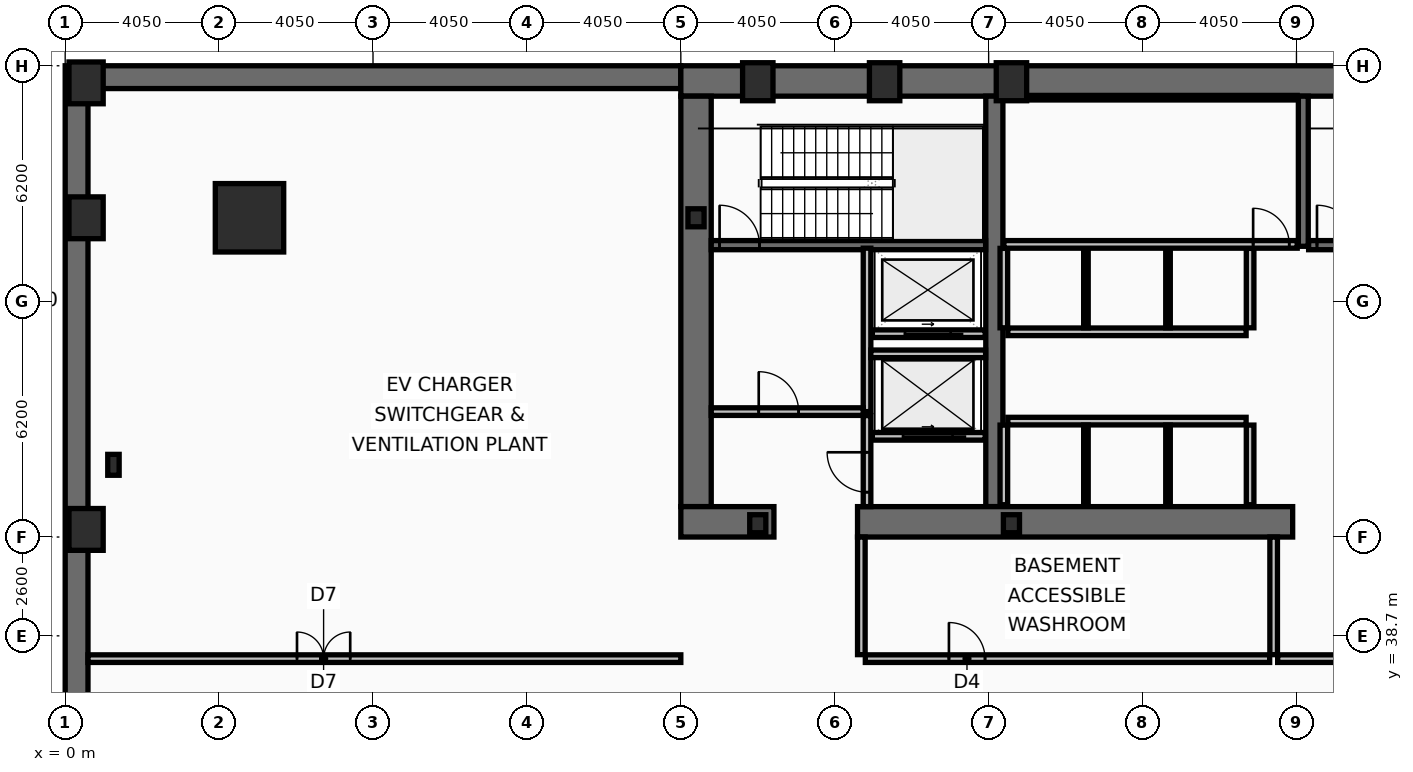
"""IFC4 building model, lengths in metres.
Left out: names, types, materials, properties, quantities, classifications, styles, units other than length and angle.
Written with IfcOpenShell. Run it as: python <this file> out.ifc"""

import sys

from ifc_helpers import new_model, si_unit, direction, frame, frame_2d, origin, origin_2d, place, context, subcontext, project, spatial, rectangle, hollow_rectangle, i_section, extrude, element, fill, save


model = new_model("IFC4")
c1 = context("Model", 3, precision=1e-05, world=origin(), true_north=direction((0.0, 1.0)))
c2 = subcontext(c1, "Body", "Model", "MODEL_VIEW")
j1 = project(units=[si_unit("LENGTHUNIT", "METRE"), si_unit("PLANEANGLEUNIT", "RADIAN")], contexts=[c1])
p1 = place(None, origin())
s1 = spatial("IfcSite", under=j1, at=p1, CompositionType="ELEMENT")
p2 = place(p1, origin())
s2 = spatial("IfcBuilding", under=s1, at=p2, CompositionType="ELEMENT")
p3 = place(p2, frame((0.0, 0.0, -4.5)))
s3 = spatial("IfcBuildingStorey", under=s2, at=p3, CompositionType="ELEMENT", Elevation=-4.5)
p4 = place(p3, frame((0.3, 0.0, 0.0), z_axis=(0.0, 0.0, 1.0), x_axis=(0.0, 1.0, 0.0)))
e1 = element("IfcWall", 1, at=p4, inside=s3, PredefinedType="SOLIDWALL", context=c2, shape_type="SweptSolid", body=[
    extrude(rectangle(XDim=53.7, YDim=0.6, at=frame_2d((26.85, 0.0))), origin(), (0.0, 0.0, 1.0), 4.28),
])
p5 = place(p3, frame((0.6, 53.4, 0.0), z_axis=(0.0, 0.0, 1.0), x_axis=(1.0, 0.0, 0.0)))
e2 = element("IfcWall", 2, at=p5, inside=s3, PredefinedType="SOLIDWALL", context=c2, shape_type="SweptSolid", body=[
    extrude(rectangle(XDim=15.6, YDim=0.6, at=frame_2d((7.8, 0.0))), origin(), (0.0, 0.0, 1.0), 4.28),
])
p6 = place(p3, frame((16.2, 53.3, 0.0), z_axis=(0.0, 0.0, 1.0), x_axis=(1.0, 0.0, 0.0)))
e3 = element("IfcWall", 3, at=p6, inside=s3, PredefinedType="SHEAR", context=c2, shape_type="SweptSolid", body=[
    extrude(rectangle(XDim=40.5, YDim=0.8, at=frame_2d((20.25, 0.0))), origin(), (0.0, 0.0, 1.0), 4.28),
])
p7 = place(p3, frame((16.6, 42.1, 0.0), z_axis=(0.0, 0.0, 1.0), x_axis=(0.0, 1.0, 0.0)))
e4 = element("IfcWall", 4, at=p7, inside=s3, PredefinedType="SHEAR", context=c2, shape_type="SweptSolid", body=[
    extrude(rectangle(XDim=10.8, YDim=0.8, at=frame_2d((5.4, 0.0))), origin(), (0.0, 0.0, 1.0), 4.28),
])
p8 = place(p3, frame((24.45, 42.1, 0.0), z_axis=(0.0, 0.0, 1.0), x_axis=(0.0, 1.0, 0.0)))
e5 = element("IfcWall", 5, at=p8, inside=s3, PredefinedType="SHEAR", context=c2, shape_type="SweptSolid", body=[
    extrude(rectangle(XDim=10.8, YDim=0.45, at=frame_2d((5.4, 0.0))), origin(), (0.0, 0.0, 1.0), 4.28),
])
p9 = place(p3, frame((18.65, 41.7, 0.0), z_axis=(0.0, 0.0, 1.0), x_axis=(-1.0, 0.0, 0.0)))
e6 = element("IfcWall", 6, at=p9, inside=s3, PredefinedType="SHEAR", context=c2, shape_type="SweptSolid", body=[
    extrude(rectangle(XDim=2.45, YDim=0.8, at=frame_2d((1.225, 0.0))), origin(), (0.0, 0.0, 1.0), 4.28),
])
p10 = place(p3, frame((32.3, 41.7, 0.0), z_axis=(0.0, 0.0, 1.0), x_axis=(-1.0, 0.0, 0.0)))
e7 = element("IfcWall", 7, at=p10, inside=s3, PredefinedType="SHEAR", context=c2, shape_type="SweptSolid", body=[
    extrude(rectangle(XDim=11.45, YDim=0.8, at=frame_2d((5.725, 0.0))), origin(), (0.0, 0.0, 1.0), 4.28),
])
p11 = place(p3, frame((32.58, 48.95, 0.0), z_axis=(0.0, 0.0, 1.0), x_axis=(0.0, 1.0, 0.0)))
e8 = element("IfcWall", 8, at=p11, inside=s3, PredefinedType="SHEAR", context=c2, shape_type="SweptSolid", body=[
    extrude(rectangle(XDim=3.95, YDim=0.26, at=frame_2d((1.975, 0.0))), origin(), (0.0, 0.0, 1.0), 4.28),
])
p12 = place(p3, frame((17.0, 48.98, 0.0), z_axis=(0.0, 0.0, 1.0), x_axis=(1.0, 0.0, 0.0)))
e9 = element("IfcWall", 9, at=p12, inside=s3, PredefinedType="SHEAR", context=c2, shape_type="SweptSolid", body=[
    extrude(rectangle(XDim=7.22, YDim=0.24, at=frame_2d((3.61, 0.0))), origin(), (0.0, 0.0, 1.0), 4.28),
])
p13 = place(p12, frame((0.22, 0.0, 0.0)))
e10 = element("IfcOpeningElement", 10, at=p13, cuts=e9, PredefinedType="OPENING", context=c2, shape_type="SweptSolid", body=[
    extrude(rectangle(XDim=1.05, YDim=2.15, at=frame_2d((0.525, 1.075))), frame((0.0, 0.13, 0.0), z_axis=(0.0, -1.0, 0.0), x_axis=(1.0, 0.0, 0.0)), (0.0, 0.0, 1.0), 0.26),
])
p14 = place(p3, frame((32.72, 48.98, 0.0), z_axis=(0.0, 0.0, 1.0), x_axis=(1.0, 0.0, 0.0)))
e11 = element("IfcWall", 11, at=p14, inside=s3, PredefinedType="SHEAR", context=c2, shape_type="SweptSolid", body=[
    extrude(rectangle(XDim=7.56, YDim=0.24, at=frame_2d((3.78, 0.0))), origin(), (0.0, 0.0, 1.0), 4.28),
])
p15 = place(p14, frame((0.22, 0.0, 0.0)))
e12 = element("IfcOpeningElement", 12, at=p15, cuts=e11, PredefinedType="OPENING", context=c2, shape_type="SweptSolid", body=[
    extrude(rectangle(XDim=1.05, YDim=2.15, at=frame_2d((0.525, 1.075))), frame((0.0, 0.13, 0.0), z_axis=(0.0, -1.0, 0.0), x_axis=(1.0, 0.0, 0.0)), (0.0, 0.0, 1.0), 0.26),
])
p16 = place(p3, frame((4.85, 49.7, 0.0), z_axis=(0.0, 0.0, 1.0), x_axis=(1.0, 0.0, 0.0)))
e13 = element("IfcColumn", 13, at=p16, inside=s3, PredefinedType="COLUMN", context=c2, shape_type="SweptSolid", body=[
    extrude(hollow_rectangle(XDim=1.8, YDim=1.8, WallThickness=0.08, at=origin_2d()), origin(), (0.0, 0.0, 1.0), 4.5),
])
for number, where, z_axis, x_axis in (
    (14, (18.225, 53.28, 0.0), (0.0, 0.0, 1.0), (1.0, 0.0, 0.0)),
    (15, (21.562, 53.28, 0.0), (0.0, 0.0, 1.0), (1.0, 0.0, 0.0)),
    (16, (24.9, 53.28, 0.0), (0.0, 0.0, 1.0), (1.0, 0.0, 0.0)),
):
    element("IfcColumn", number, at=place(p3, frame(where, z_axis=z_axis, x_axis=x_axis)), inside=s3, PredefinedType="COLUMN", context=c2, shape_type="SweptSolid", body=[
        extrude(hollow_rectangle(XDim=0.8, YDim=1.0, WallThickness=0.055, at=origin_2d()), origin(), (0.0, 0.0, 1.0), 4.5),
    ])
p17 = place(p3, frame((1.27, 43.2, 0.0), z_axis=(0.0, 0.0, 1.0), x_axis=(1.0, 0.0, 0.0)))
e17 = element("IfcColumn", 17, at=p17, inside=s3, PredefinedType="COLUMN", context=c2, shape_type="SweptSolid", body=[
    extrude(i_section(OverallWidth=0.3, OverallDepth=0.55, WebThickness=0.015, FlangeThickness=0.029, at=origin_2d()), origin(), (0.0, 0.0, 1.0), 4.5),
])
for number, where, z_axis, x_axis in (
    (18, (16.6, 49.7, 0.0), (0.0, 0.0, 1.0), (1.0, 0.0, 0.0)),
    (19, (18.225, 41.65, 0.0), (0.0, 0.0, 1.0), (1.0, 0.0, 0.0)),
    (20, (24.9, 41.65, 0.0), (0.0, 0.0, 1.0), (1.0, 0.0, 0.0)),
):
    element("IfcColumn", number, at=place(p3, frame(where, z_axis=z_axis, x_axis=x_axis)), inside=s3, PredefinedType="COLUMN", context=c2, shape_type="SweptSolid", body=[
        extrude(i_section(OverallWidth=0.424, OverallDepth=0.474, WebThickness=0.048, FlangeThickness=0.077, at=origin_2d()), origin(), (0.0, 0.0, 1.0), 4.5),
    ])
for number, where, z_axis, x_axis in (
    (21, (0.55, 49.7, 0.0), (0.0, 0.0, 1.0), (1.0, 0.0, 0.0)),
    (22, (0.55, 53.25, 0.0), (0.0, 0.0, 1.0), (1.0, 0.0, 0.0)),
    (23, (0.55, 41.5, 0.0), (0.0, 0.0, 1.0), (1.0, 0.0, 0.0)),
):
    element("IfcColumn", number, at=place(p3, frame(where, z_axis=z_axis, x_axis=x_axis)), inside=s3, PredefinedType="PILASTER", context=c2, shape_type="SweptSolid", body=[
        extrude(rectangle(XDim=0.9, YDim=1.1, at=origin_2d()), origin(), (0.0, 0.0, 1.0), 4.5),
    ])
p18 = place(p3, frame((24.21, 43.95, 0.0), z_axis=(0.0, 0.0, 1.0), x_axis=(-1.0, 0.0, 0.0)))
e24 = element("IfcWall", 24, at=p18, inside=s3, PredefinedType="PARTITIONING", context=c2, shape_type="SweptSolid", body=[
    extrude(rectangle(XDim=2.97, YDim=0.2, at=frame_2d((1.485, 0.0))), origin(), (0.0, 0.0, 1.0), 4.28),
])
p19 = place(p18, frame((0.86, 0.0, 0.0)))
e25 = element("IfcOpeningElement", 25, at=p19, cuts=e24, PredefinedType="OPENING", context=c2, shape_type="SweptSolid", body=[
    extrude(rectangle(XDim=1.3, YDim=2.18, at=frame_2d((0.65, 1.09))), frame((0.0, 0.11, 0.0), z_axis=(0.0, -1.0, 0.0), x_axis=(1.0, 0.0, 0.0)), (0.0, 0.0, 1.0), 0.22),
])
p20 = place(p3, frame((24.21, 46.65, 0.0), z_axis=(0.0, 0.0, 1.0), x_axis=(-1.0, 0.0, 0.0)))
e26 = element("IfcWall", 26, at=p20, inside=s3, PredefinedType="PARTITIONING", context=c2, shape_type="SweptSolid", body=[
    extrude(rectangle(XDim=2.97, YDim=0.2, at=frame_2d((1.485, 0.0))), origin(), (0.0, 0.0, 1.0), 4.28),
])
p21 = place(p20, frame((0.91, 0.0, 0.0)))
e27 = element("IfcOpeningElement", 27, at=p21, cuts=e26, PredefinedType="OPENING", context=c2, shape_type="SweptSolid", body=[
    extrude(rectangle(XDim=1.2, YDim=2.18, at=frame_2d((0.6, 1.09))), frame((0.0, 0.11, 0.0), z_axis=(0.0, -1.0, 0.0), x_axis=(1.0, 0.0, 0.0)), (0.0, 0.0, 1.0), 0.22),
])
p22 = place(p3, frame((21.1, 44.6, 0.0), z_axis=(0.0, 0.0, 1.0), x_axis=(0.0, 1.0, 0.0)))
e28 = element("IfcWall", 28, at=p22, inside=s3, PredefinedType="PARTITIONING", context=c2, shape_type="SweptSolid", body=[
    extrude(rectangle(XDim=4.3, YDim=0.2, at=frame_2d((2.15, 0.0))), origin(), (0.0, 0.0, 1.0), 4.28),
])
p23 = place(p3, frame((17.0, 44.6, 0.0), z_axis=(0.0, 0.0, 1.0), x_axis=(1.0, 0.0, 0.0)))
e29 = element("IfcWall", 29, at=p23, inside=s3, PredefinedType="PARTITIONING", context=c2, shape_type="SweptSolid", body=[
    extrude(rectangle(XDim=4.0, YDim=0.2, at=frame_2d((2.0, 0.0))), origin(), (0.0, 0.0, 1.0), 4.28),
])
p24 = place(p23, frame((1.25, 0.0, 0.0)))
e30 = element("IfcOpeningElement", 30, at=p24, cuts=e29, PredefinedType="OPENING", context=c2, shape_type="SweptSolid", body=[
    extrude(rectangle(XDim=1.05, YDim=2.15, at=frame_2d((0.525, 1.075))), frame((0.0, 0.11, 0.0), z_axis=(0.0, -1.0, 0.0), x_axis=(1.0, 0.0, 0.0)), (0.0, 0.0, 1.0), 0.22),
])
p25 = place(p3, frame((21.2, 46.12, 0.0), z_axis=(0.0, 0.0, 1.0), x_axis=(1.0, 0.0, 0.0)))
e31 = element("IfcWall", 31, at=p25, inside=s3, PredefinedType="PARTITIONING", context=c2, shape_type="SweptSolid", body=[
    extrude(rectangle(XDim=3.02, YDim=0.2, at=frame_2d((1.51, 0.0))), origin(), (0.0, 0.0, 1.0), 4.28),
])
p26 = place(p3, frame((21.1, 42.1, 0.0), z_axis=(0.0, 0.0, 1.0), x_axis=(0.0, 1.0, 0.0)))
e32 = element("IfcWall", 32, at=p26, inside=s3, PredefinedType="PARTITIONING", context=c2, shape_type="SweptSolid", body=[
    extrude(rectangle(XDim=2.395, YDim=0.2, at=frame_2d((1.198, 0.0))), origin(), (0.0, 0.0, 1.0), 4.28),
])
p27 = place(p26, frame((0.38, 0.0, 0.0)))
e33 = element("IfcOpeningElement", 33, at=p27, cuts=e32, PredefinedType="OPENING", context=c2, shape_type="SweptSolid", body=[
    extrude(rectangle(XDim=1.05, YDim=2.15, at=frame_2d((0.525, 1.075))), frame((0.0, 0.11, 0.0), z_axis=(0.0, -1.0, 0.0), x_axis=(1.0, 0.0, 0.0)), (0.0, 0.0, 1.0), 0.22),
])
p28 = place(p3, frame((24.805, 46.7, 0.0), z_axis=(0.0, 0.0, 1.0), x_axis=(1.0, 0.0, 0.0)))
e34 = element("IfcWall", 34, at=p28, inside=s3, PredefinedType="PARTITIONING", context=c2, shape_type="SweptSolid", body=[
    extrude(rectangle(XDim=6.27, YDim=0.2, at=frame_2d((3.135, 0.0))), origin(), (0.0, 0.0, 1.0), 4.28),
])
for number, where, z_axis, x_axis in (
    (35, (24.7, 46.805, 0.0), (0.0, 0.0, 1.0), (0.0, 1.0, 0.0)),
    (36, (31.18, 46.805, 0.0), (0.0, 0.0, 1.0), (0.0, 1.0, 0.0)),
):
    element("IfcWall", number, at=place(p3, frame(where, z_axis=z_axis, x_axis=x_axis)), inside=s3, PredefinedType="PARTITIONING", context=c2, shape_type="SweptSolid", body=[
        extrude(rectangle(XDim=2.09, YDim=0.2, at=frame_2d((1.045, 0.0))), origin(), (0.0, 0.0, 1.0), 4.28),
    ])
for number, where, z_axis, x_axis in (
    (37, (26.86, 46.805, 0.0), (0.0, 0.0, 1.0), (0.0, 1.0, 0.0)),
    (38, (29.02, 46.805, 0.0), (0.0, 0.0, 1.0), (0.0, 1.0, 0.0)),
):
    element("IfcWall", number, at=place(p3, frame(where, z_axis=z_axis, x_axis=x_axis)), inside=s3, PredefinedType="PARTITIONING", context=c2, shape_type="SweptSolid", body=[
        extrude(rectangle(XDim=2.09, YDim=0.12, at=frame_2d((1.045, 0.0))), origin(), (0.0, 0.0, 1.0), 4.28),
    ])
p29 = place(p3, frame((24.805, 44.35, 0.0), z_axis=(0.0, 0.0, 1.0), x_axis=(1.0, 0.0, 0.0)))
e39 = element("IfcWall", 39, at=p29, inside=s3, PredefinedType="PARTITIONING", context=c2, shape_type="SweptSolid", body=[
    extrude(rectangle(XDim=6.27, YDim=0.2, at=frame_2d((3.135, 0.0))), origin(), (0.0, 0.0, 1.0), 4.28),
])
for number, where, z_axis, x_axis in (
    (40, (24.7, 42.15, 0.0), (0.0, 0.0, 1.0), (0.0, 1.0, 0.0)),
    (41, (31.18, 42.15, 0.0), (0.0, 0.0, 1.0), (0.0, 1.0, 0.0)),
):
    element("IfcWall", number, at=place(p3, frame(where, z_axis=z_axis, x_axis=x_axis)), inside=s3, PredefinedType="PARTITIONING", context=c2, shape_type="SweptSolid", body=[
        extrude(rectangle(XDim=2.095, YDim=0.2, at=frame_2d((1.048, 0.0))), origin(), (0.0, 0.0, 1.0), 4.28),
    ])
for number, where, z_axis, x_axis in (
    (42, (26.86, 42.15, 0.0), (0.0, 0.0, 1.0), (0.0, 1.0, 0.0)),
    (43, (29.02, 42.15, 0.0), (0.0, 0.0, 1.0), (0.0, 1.0, 0.0)),
):
    element("IfcWall", number, at=place(p3, frame(where, z_axis=z_axis, x_axis=x_axis)), inside=s3, PredefinedType="PARTITIONING", context=c2, shape_type="SweptSolid", body=[
        extrude(rectangle(XDim=2.095, YDim=0.12, at=frame_2d((1.048, 0.0))), origin(), (0.0, 0.0, 1.0), 4.28),
    ])
p30 = place(p3, frame((24.7, 52.86, 0.0), z_axis=(0.0, 0.0, 1.0), x_axis=(1.0, 0.0, 0.0)))
e44 = element("IfcWall", 44, at=p30, inside=s3, PredefinedType="PARTITIONING", context=c2, shape_type="SweptSolid", body=[
    extrude(rectangle(XDim=7.72, YDim=0.12, at=frame_2d((3.86, 0.0))), origin(), (0.0, 0.0, 1.0), 4.28),
])
p31 = place(p3, frame((24.7, 49.0, 0.0), z_axis=(0.0, 0.0, 1.0), x_axis=(1.0, 0.0, 0.0)))
e45 = element("IfcWall", 45, at=p31, inside=s3, PredefinedType="PARTITIONING", context=c2, shape_type="SweptSolid", body=[
    extrude(rectangle(XDim=7.72, YDim=0.2, at=frame_2d((3.86, 0.0))), origin(), (0.0, 0.0, 1.0), 4.28),
])
p32 = place(p31, frame((6.56, 0.0, 0.0)))
e46 = element("IfcOpeningElement", 46, at=p32, cuts=e45, PredefinedType="OPENING", context=c2, shape_type="SweptSolid", body=[
    extrude(rectangle(XDim=0.95, YDim=2.1, at=frame_2d((0.475, 1.05))), frame((0.0, 0.11, 0.0), z_axis=(0.0, -1.0, 0.0), x_axis=(1.0, 0.0, 0.0)), (0.0, 0.0, 1.0), 0.22),
])
p33 = place(p3, frame((31.905, 38.1, 0.0), z_axis=(0.0, 0.0, 1.0), x_axis=(1.0, 0.0, 0.0)))
e47 = element("IfcWall", 47, at=p33, inside=s3, PredefinedType="PARTITIONING", context=c2, shape_type="SweptSolid", body=[
    extrude(rectangle(XDim=9.19, YDim=0.2, at=frame_2d((4.595, 0.0))), origin(), (0.0, 0.0, 1.0), 4.28),
])
p34 = place(p33, frame((3.8, 0.0, 0.0)))
e48 = element("IfcOpeningElement", 48, at=p34, cuts=e47, PredefinedType="OPENING", context=c2, shape_type="SweptSolid", body=[
    extrude(rectangle(XDim=1.5, YDim=2.15, at=frame_2d((0.75, 1.075))), frame((0.0, 0.11, 0.0), z_axis=(0.0, -1.0, 0.0), x_axis=(1.0, 0.0, 0.0)), (0.0, 0.0, 1.0), 0.22),
])
p35 = place(p3, frame((31.8, 38.205, 0.0), z_axis=(0.0, 0.0, 1.0), x_axis=(0.0, 1.0, 0.0)))
e49 = element("IfcWall", 49, at=p35, inside=s3, PredefinedType="PARTITIONING", context=c2, shape_type="SweptSolid", body=[
    extrude(rectangle(XDim=3.095, YDim=0.2, at=frame_2d((1.547, 0.0))), origin(), (0.0, 0.0, 1.0), 4.28),
])
p36 = place(p3, frame((0.6, 38.1, 0.0), z_axis=(0.0, 0.0, 1.0), x_axis=(1.0, 0.0, 0.0)))
e50 = element("IfcWall", 50, at=p36, inside=s3, PredefinedType="PARTITIONING", context=c2, shape_type="SweptSolid", body=[
    extrude(rectangle(XDim=15.6, YDim=0.2, at=frame_2d((7.8, 0.0))), origin(), (0.0, 0.0, 1.0), 3.59),
])
p37 = place(p36, frame((5.5, 0.0, 0.0)))
e51 = element("IfcOpeningElement", 51, at=p37, cuts=e50, PredefinedType="OPENING", context=c2, shape_type="SweptSolid", body=[
    extrude(rectangle(XDim=1.4, YDim=2.15, at=frame_2d((0.7, 1.075))), frame((0.0, 0.11, 0.0), z_axis=(0.0, -1.0, 0.0), x_axis=(1.0, 0.0, 0.0)), (0.0, 0.0, 1.0), 0.22),
])
p38 = place(p3, frame((20.95, 38.205, 0.0), z_axis=(0.0, 0.0, 1.0), x_axis=(0.0, 1.0, 0.0)))
e52 = element("IfcWall", 52, at=p38, inside=s3, PredefinedType="PARTITIONING", context=c2, shape_type="SweptSolid", body=[
    extrude(rectangle(XDim=3.095, YDim=0.2, at=frame_2d((1.547, 0.0))), origin(), (0.0, 0.0, 1.0), 4.28),
])
p39 = place(p3, frame((21.055, 38.1, 0.0), z_axis=(0.0, 0.0, 1.0), x_axis=(1.0, 0.0, 0.0)))
e53 = element("IfcWall", 53, at=p39, inside=s3, PredefinedType="PARTITIONING", context=c2, shape_type="SweptSolid", body=[
    extrude(rectangle(XDim=10.64, YDim=0.2, at=frame_2d((5.32, 0.0))), origin(), (0.0, 0.0, 1.0), 3.37),
])
p40 = place(p39, frame((2.2, 0.0, 0.0)))
e54 = element("IfcOpeningElement", 54, at=p40, cuts=e53, PredefinedType="OPENING", context=c2, shape_type="SweptSolid", body=[
    extrude(rectangle(XDim=0.95, YDim=2.05, at=frame_2d((0.475, 1.025))), frame((0.0, 0.11, 0.0), z_axis=(0.0, -1.0, 0.0), x_axis=(1.0, 0.0, 0.0)), (0.0, 0.0, 1.0), 0.22),
])
p41 = place(p13, origin())
e55 = element("IfcDoor", 55, at=p41, inside=s3, OperationType="SINGLE_SWING_LEFT", PredefinedType="DOOR", context=c2, shape_type="SweptSolid", body=[
    extrude(rectangle(XDim=1.05, YDim=2.15, at=frame_2d((0.525, 1.075))), frame((0.0, 0.025, 0.0), z_axis=(0.0, -1.0, 0.0), x_axis=(1.0, 0.0, 0.0)), (0.0, 0.0, 1.0), 0.05),
])
fill(e10, e55)
p42 = place(p15, origin())
e56 = element("IfcDoor", 56, at=p42, inside=s3, OperationType="SINGLE_SWING_LEFT", PredefinedType="DOOR", context=c2, shape_type="SweptSolid", body=[
    extrude(rectangle(XDim=1.05, YDim=2.15, at=frame_2d((0.525, 1.075))), frame((0.0, 0.025, 0.0), z_axis=(0.0, -1.0, 0.0), x_axis=(1.0, 0.0, 0.0)), (0.0, 0.0, 1.0), 0.05),
])
fill(e12, e56)
p43 = place(p19, origin())
e57 = element("IfcDoor", 57, at=p43, inside=s3, OperationType="SLIDING_TO_LEFT", PredefinedType="DOOR", context=c2, shape_type="SweptSolid", body=[
    extrude(rectangle(XDim=1.3, YDim=2.18, at=frame_2d((0.65, 1.09))), frame((0.0, 0.025, 0.0), z_axis=(0.0, -1.0, 0.0), x_axis=(1.0, 0.0, 0.0)), (0.0, 0.0, 1.0), 0.05),
])
fill(e25, e57)
p44 = place(p21, origin())
e58 = element("IfcDoor", 58, at=p44, inside=s3, OperationType="SLIDING_TO_LEFT", PredefinedType="DOOR", context=c2, shape_type="SweptSolid", body=[
    extrude(rectangle(XDim=1.2, YDim=2.18, at=frame_2d((0.6, 1.09))), frame((0.0, 0.025, 0.0), z_axis=(0.0, -1.0, 0.0), x_axis=(1.0, 0.0, 0.0)), (0.0, 0.0, 1.0), 0.05),
])
fill(e27, e58)
p45 = place(p24, origin())
e59 = element("IfcDoor", 59, at=p45, inside=s3, OperationType="SINGLE_SWING_LEFT", PredefinedType="DOOR", context=c2, shape_type="SweptSolid", body=[
    extrude(rectangle(XDim=1.05, YDim=2.15, at=frame_2d((0.525, 1.075))), frame((0.0, 0.025, 0.0), z_axis=(0.0, -1.0, 0.0), x_axis=(1.0, 0.0, 0.0)), (0.0, 0.0, 1.0), 0.05),
])
fill(e30, e59)
p46 = place(p27, origin())
e60 = element("IfcDoor", 60, at=p46, inside=s3, OperationType="SINGLE_SWING_RIGHT", PredefinedType="DOOR", context=c2, shape_type="SweptSolid", body=[
    extrude(rectangle(XDim=1.05, YDim=2.15, at=frame_2d((0.525, 1.075))), frame((0.0, 0.025, 0.0), z_axis=(0.0, -1.0, 0.0), x_axis=(1.0, 0.0, 0.0)), (0.0, 0.0, 1.0), 0.05),
])
fill(e33, e60)
p47 = place(p32, origin())
e61 = element("IfcDoor", 61, at=p47, inside=s3, OperationType="SINGLE_SWING_LEFT", PredefinedType="DOOR", context=c2, shape_type="SweptSolid", body=[
    extrude(rectangle(XDim=0.95, YDim=2.1, at=frame_2d((0.475, 1.05))), frame((0.0, 0.025, 0.0), z_axis=(0.0, -1.0, 0.0), x_axis=(1.0, 0.0, 0.0)), (0.0, 0.0, 1.0), 0.05),
])
fill(e46, e61)
p48 = place(p37, origin())
e62 = element("IfcDoor", 62, at=p48, inside=s3, OperationType="DOUBLE_DOOR_SINGLE_SWING", PredefinedType="DOOR", context=c2, shape_type="SweptSolid", body=[
    extrude(rectangle(XDim=1.4, YDim=2.15, at=frame_2d((0.7, 1.075))), frame((0.0, 0.025, 0.0), z_axis=(0.0, -1.0, 0.0), x_axis=(1.0, 0.0, 0.0)), (0.0, 0.0, 1.0), 0.05),
])
fill(e51, e62)
p49 = place(p40, origin())
e63 = element("IfcDoor", 63, at=p49, inside=s3, OperationType="SINGLE_SWING_LEFT", PredefinedType="DOOR", context=c2, shape_type="SweptSolid", body=[
    extrude(rectangle(XDim=0.95, YDim=2.05, at=frame_2d((0.475, 1.025))), frame((0.0, 0.025, 0.0), z_axis=(0.0, -1.0, 0.0), x_axis=(1.0, 0.0, 0.0)), (0.0, 0.0, 1.0), 0.05),
])
fill(e54, e63)
save(model, sys.argv[1])
